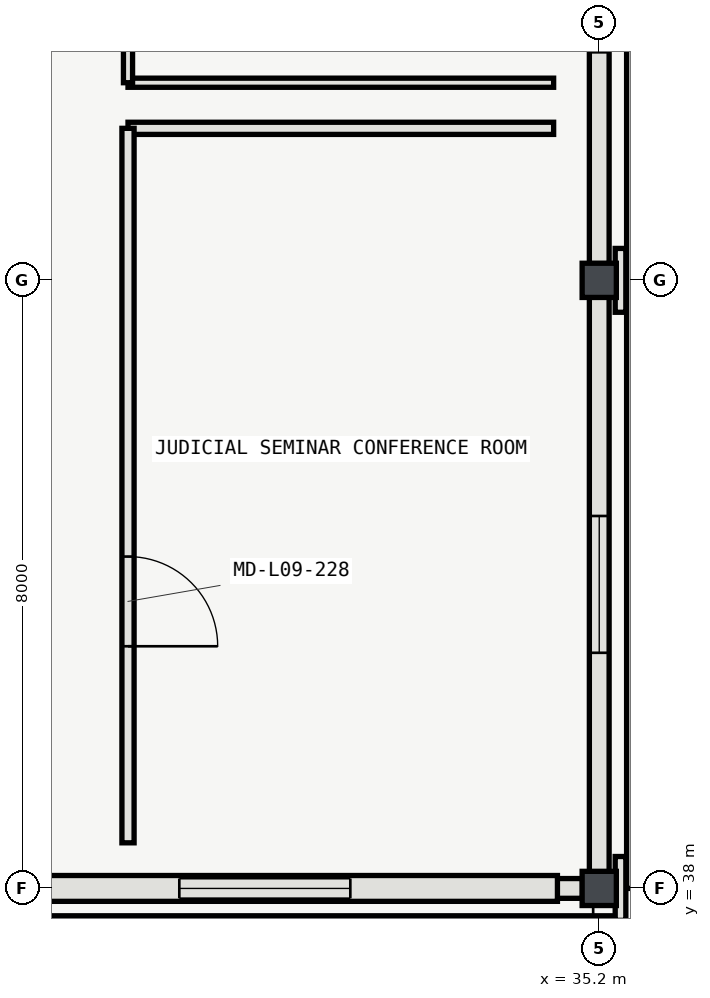
"""IFC4 building model, lengths in metres.
Left out: names, types, materials, properties, quantities, classifications, styles, units other than length and angle.
Written with IfcOpenShell. Run it as: python <this file> out.ifc"""

import sys

from ifc_helpers import new_model, si_unit, direction, frame, frame_2d, origin, origin_2d, place, context, subcontext, project, spatial, polyline, rectangle, hollow_rectangle, outline, extrude, element, fill, save


model = new_model("IFC4")
c1 = context("Model", 3, precision=1e-05, world=origin(), true_north=direction((0.0, 1.0)))
c2 = subcontext(c1, "Body", "Model", "MODEL_VIEW")
j1 = project(units=[si_unit("LENGTHUNIT", "METRE"), si_unit("PLANEANGLEUNIT", "RADIAN")], contexts=[c1])
p1 = place(None, origin())
s1 = spatial("IfcSite", under=j1, at=p1, CompositionType="ELEMENT")
p2 = place(p1, origin())
s2 = spatial("IfcBuilding", under=s1, at=p2, CompositionType="ELEMENT")
p3 = place(p2, frame((0.0, 0.0, 41.4)))
s3 = spatial("IfcBuildingStorey", under=s2, at=p3, CompositionType="ELEMENT", Elevation=41.4)
for number, where, z_axis, x_axis in (
    (1, (35.2, 38.0, 0.0), (0.0, 0.0, 1.0), (1.0, 0.0, 0.0)),
    (2, (35.2, 46.0, 0.0), (0.0, 0.0, 1.0), (1.0, 0.0, 0.0)),
):
    element("IfcColumn", number, at=place(p3, frame(where, z_axis=z_axis, x_axis=x_axis)), inside=s3, PredefinedType="COLUMN", context=c2, shape_type="SweptSolid", body=[
        extrude(hollow_rectangle(XDim=0.45, YDim=0.45, WallThickness=0.018, InnerFilletRadius=0.018, OuterFilletRadius=0.036, at=origin_2d()), origin(), (0.0, 0.0, 1.0), 4.2),
    ])
p4 = place(p3, frame((26.621, 38.0, 0.0), z_axis=(0.0, 0.0, 1.0), x_axis=(1.0, 0.0, 0.0)))
e3 = element("IfcWall", 3, at=p4, inside=s3, PredefinedType="SOLIDWALL", context=c2, shape_type="SweptSolid", body=[
    extrude(rectangle(XDim=8.358, YDim=0.26, at=frame_2d((4.179, 0.0))), origin(), (0.0, 0.0, 1.0), 3.473),
])
p5 = place(p4, frame((3.054, 0.0, 0.95)))
e4 = element("IfcOpeningElement", 4, at=p5, cuts=e3, PredefinedType="OPENING", context=c2, shape_type="SweptSolid", body=[
    extrude(rectangle(XDim=2.25, YDim=1.95, at=frame_2d((1.125, 0.975))), frame((0.0, 0.14, 0.0), z_axis=(0.0, -1.0, 0.0), x_axis=(1.0, 0.0, 0.0)), (0.0, 0.0, 1.0), 0.28),
])
p6 = place(p3, frame((35.2, 38.221, 0.0), z_axis=(0.0, 0.0, 1.0), x_axis=(0.0, 1.0, 0.0)))
e5 = element("IfcWall", 5, at=p6, inside=s3, PredefinedType="SOLIDWALL", context=c2, shape_type="SweptSolid", body=[
    extrude(rectangle(XDim=7.558, YDim=0.26, at=frame_2d((3.779, 0.0))), origin(), (0.0, 0.0, 1.0), 3.473),
])
p7 = place(p6, frame((2.879, 0.0, 0.95)))
e6 = element("IfcOpeningElement", 6, at=p7, cuts=e5, PredefinedType="OPENING", context=c2, shape_type="SweptSolid", body=[
    extrude(rectangle(XDim=1.8, YDim=1.8, at=frame_2d((0.9, 0.9))), frame((0.0, 0.14, 0.0), z_axis=(0.0, -1.0, 0.0), x_axis=(1.0, 0.0, 0.0)), (0.0, 0.0, 1.0), 0.28),
])
p8 = place(p3, frame((35.2, 46.221, 0.0), z_axis=(0.0, 0.0, 1.0), x_axis=(0.0, 1.0, 0.0)))
e7 = element("IfcWall", 7, at=p8, inside=s3, PredefinedType="SOLIDWALL", context=c2, shape_type="SweptSolid", body=[
    extrude(rectangle(XDim=7.558, YDim=0.26, at=frame_2d((3.779, 0.0))), origin(), (0.0, 0.0, 1.0), 3.473),
])
p9 = place(p8, frame((2.779, 0.0, 0.95)))
e8 = element("IfcOpeningElement", 8, at=p9, cuts=e7, PredefinedType="OPENING", context=c2, shape_type="SweptSolid", body=[
    extrude(rectangle(XDim=2.0, YDim=1.8, at=frame_2d((1.0, 0.9))), frame((0.0, 0.14, 0.0), z_axis=(0.0, -1.0, 0.0), x_axis=(1.0, 0.0, 0.0)), (0.0, 0.0, 1.0), 0.28),
])
p10 = place(p3, frame((0.55, 38.0, 4.42), z_axis=(0.0, 0.0, 1.0), x_axis=(1.0, 0.0, 0.0)))
e9 = element("IfcWall", 9, at=p10, inside=s3, PredefinedType="SOLIDWALL", context=c2, shape_type="SweptSolid", body=[
    extrude(outline(polyline([(0.0, 0.0), (34.1, 0.0), (34.1, 0.2), (12.012, 3.0), (0.0, 0.2), (0.0, 0.0)])), frame((0.0, 0.17, 0.0), z_axis=(0.0, -1.0, 0.0), x_axis=(1.0, 0.0, 0.0)), (0.0, 0.0, 1.0), 0.34),
])
p11 = place(p10, frame((11.012, 0.0, 0.55)))
e10 = element("IfcOpeningElement", 10, at=p11, cuts=e9, PredefinedType="OPENING", context=c2, shape_type="SweptSolid", body=[
    extrude(outline(polyline([(2.0, 1.0), (1.985, 1.174), (1.94, 1.342), (1.866, 1.5), (1.766, 1.643), (1.643, 1.766), (1.5, 1.866), (1.342, 1.94), (1.174, 1.985), (1.0, 2.0), (0.826, 1.985), (0.658, 1.94), (0.5, 1.866), (0.357, 1.766), (0.234, 1.643), (0.134, 1.5), (0.06, 1.342), (0.015, 1.174), (0.0, 1.0), (0.015, 0.826), (0.06, 0.658), (0.134, 0.5), (0.234, 0.357), (0.357, 0.234), (0.5, 0.134), (0.658, 0.06), (0.826, 0.015), (1.0, 0.0), (1.174, 0.015), (1.342, 0.06), (1.5, 0.134), (1.643, 0.234), (1.766, 0.357), (1.866, 0.5), (1.94, 0.658), (1.985, 0.826), (2.0, 1.0)])), frame((0.0, 0.18, 0.0), z_axis=(0.0, -1.0, 0.0), x_axis=(1.0, 0.0, 0.0)), (0.0, 0.0, 1.0), 0.36),
])
p12 = place(p3, frame((35.64, 38.0, 0.0), z_axis=(0.0, 0.0, 1.0), x_axis=(0.0, 1.0, 0.0)))
e11 = element("IfcWall", 11, at=p12, inside=s3, PredefinedType="SOLIDWALL", context=c2, shape_type="SweptSolid", body=[
    extrude(rectangle(XDim=32.0, YDim=0.16, at=frame_2d((16.0, 0.0))), origin(), (0.0, 0.0, 1.0), 0.58),
])
p13 = place(p3, frame((-0.34, 37.56, 0.0), z_axis=(0.0, 0.0, 1.0), x_axis=(1.0, 0.0, 0.0)))
e12 = element("IfcWall", 12, at=p13, inside=s3, PredefinedType="SOLIDWALL", context=c2, shape_type="SweptSolid", body=[
    extrude(rectangle(XDim=35.88, YDim=0.16, at=frame_2d((17.94, 0.0))), origin(), (0.0, 0.0, 1.0), 0.58),
])
for number, where, z_axis, x_axis in (
    (13, (35.48, 37.58, 0.0), (0.0, 0.0, 1.0), (0.0, 1.0, 0.0)),
    (14, (35.48, 45.58, 0.0), (0.0, 0.0, 1.0), (0.0, 1.0, 0.0)),
):
    element("IfcWall", number, at=place(p3, frame(where, z_axis=z_axis, x_axis=x_axis)), inside=s3, PredefinedType="SOLIDWALL", context=c2, shape_type="SweptSolid", body=[
        extrude(rectangle(XDim=0.84, YDim=0.14, at=frame_2d((0.42, 0.0))), origin(), (0.0, 0.0, 1.0), 3.94),
    ])
p14 = place(p3, frame((34.6, 48.0, 0.0), z_axis=(0.0, 0.0, 1.0), x_axis=(-1.0, 0.0, 0.0)))
e15 = element("IfcWall", 15, at=p14, inside=s3, PredefinedType="PARTITIONING", context=c2, shape_type="SweptSolid", body=[
    extrude(rectangle(XDim=5.6, YDim=0.16, at=frame_2d((2.8, 0.0))), origin(), (0.0, 0.0, 1.0), 3.92),
])
p15 = place(p3, frame((29.0, 48.0, 0.0), z_axis=(0.0, 0.0, 1.0), x_axis=(0.0, -1.0, 0.0)))
e16 = element("IfcWall", 16, at=p15, inside=s3, PredefinedType="PARTITIONING", context=c2, shape_type="SweptSolid", body=[
    extrude(rectangle(XDim=9.4, YDim=0.16, at=frame_2d((4.7, 0.0))), origin(), (0.0, 0.0, 1.0), 3.92),
])
p16 = place(p15, frame((5.634, 0.0, 0.0)))
e17 = element("IfcOpeningElement", 17, at=p16, cuts=e16, PredefinedType="OPENING", context=c2, shape_type="SweptSolid", body=[
    extrude(rectangle(XDim=1.18, YDim=2.2, at=frame_2d((0.59, 1.1))), frame((0.0, 0.09, 0.0), z_axis=(0.0, -1.0, 0.0), x_axis=(1.0, 0.0, 0.0)), (0.0, 0.0, 1.0), 0.18),
])
p17 = place(p3, frame((29.0, 48.6, 0.0), z_axis=(0.0, 0.0, 1.0), x_axis=(1.0, 0.0, 0.0)))
e18 = element("IfcWall", 18, at=p17, inside=s3, PredefinedType="PARTITIONING", context=c2, shape_type="SweptSolid", body=[
    extrude(rectangle(XDim=5.6, YDim=0.12, at=frame_2d((2.8, 0.0))), origin(), (0.0, 0.0, 1.0), 3.92),
])
p18 = place(p3, frame((29.0, 52.535, 0.0), z_axis=(0.0, 0.0, 1.0), x_axis=(0.0, -1.0, 0.0)))
e19 = element("IfcWall", 19, at=p18, inside=s3, PredefinedType="PARTITIONING", context=c2, shape_type="SweptSolid", body=[
    extrude(rectangle(XDim=3.935, YDim=0.12, at=frame_2d((1.967, 0.0))), origin(), (0.0, 0.0, 1.0), 3.92),
])
p19 = place(p18, frame((1.948, 0.0, 0.0)))
e20 = element("IfcOpeningElement", 20, at=p19, cuts=e19, PredefinedType="OPENING", context=c2, shape_type="SweptSolid", body=[
    extrude(rectangle(XDim=0.98, YDim=2.2, at=frame_2d((0.49, 1.1))), frame((0.0, 0.07, 0.0), z_axis=(0.0, -1.0, 0.0), x_axis=(1.0, 0.0, 0.0)), (0.0, 0.0, 1.0), 0.14),
])
p20 = place(p5, origin())
e21 = element("IfcWindow", 21, at=p20, inside=s3, PartitioningType="SINGLE_PANEL", PredefinedType="WINDOW", context=c2, shape_type="SweptSolid", body=[
    extrude(rectangle(XDim=2.25, YDim=1.95, at=frame_2d((1.125, 0.975))), frame((0.0, 0.03, 0.0), z_axis=(0.0, -1.0, 0.0), x_axis=(1.0, 0.0, 0.0)), (0.0, 0.0, 1.0), 0.06),
])
fill(e4, e21)
p21 = place(p7, origin())
e22 = element("IfcWindow", 22, at=p21, inside=s3, PartitioningType="SINGLE_PANEL", PredefinedType="WINDOW", context=c2, shape_type="SweptSolid", body=[
    extrude(rectangle(XDim=1.8, YDim=1.8, at=frame_2d((0.9, 0.9))), frame((0.0, 0.03, 0.0), z_axis=(0.0, -1.0, 0.0), x_axis=(1.0, 0.0, 0.0)), (0.0, 0.0, 1.0), 0.06),
])
fill(e6, e22)
p22 = place(p16, origin())
e23 = element("IfcDoor", 23, at=p22, inside=s3, OperationType="SINGLE_SWING_RIGHT", PredefinedType="DOOR", context=c2, shape_type="SweptSolid", body=[
    extrude(rectangle(XDim=1.18, YDim=2.2, at=frame_2d((0.59, 1.1))), frame((0.0, 0.025, 0.0), z_axis=(0.0, -1.0, 0.0), x_axis=(1.0, 0.0, 0.0)), (0.0, 0.0, 1.0), 0.05),
])
fill(e17, e23)
save(model, sys.argv[1])
